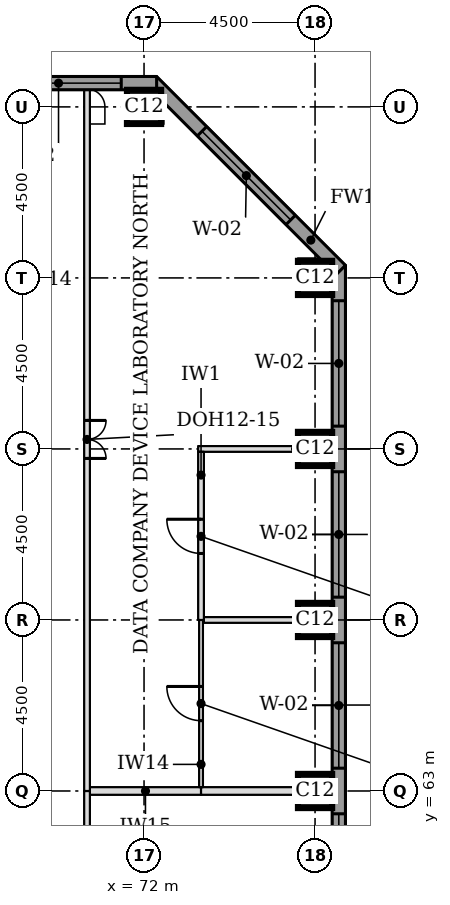
"""IFC4 building model, lengths in metres.
Left out: names, types, materials, properties, quantities, classifications, styles, units other than length and angle.
Written with IfcOpenShell. Run it as: python <this file> out.ifc"""

import sys

from ifc_helpers import new_model, si_unit, direction, frame, frame_2d, origin, origin_2d, place, context, subcontext, project, spatial, rectangle, extrude, element, fill, save


model = new_model("IFC4")
c1 = context("Model", 3, precision=1e-05, world=origin(), true_north=direction((0.0, 1.0)))
c2 = subcontext(c1, "Body", "Model", "MODEL_VIEW")
j1 = project(units=[si_unit("LENGTHUNIT", "METRE"), si_unit("PLANEANGLEUNIT", "RADIAN")], contexts=[c1])
p1 = place(None, origin())
s1 = spatial("IfcSite", under=j1, at=p1, CompositionType="ELEMENT")
p2 = place(p1, origin())
s2 = spatial("IfcBuilding", under=s1, at=p2, CompositionType="ELEMENT")
p3 = place(p2, frame((0.0, 0.0, 252.6)))
s3 = spatial("IfcBuildingStorey", under=s2, at=p3, CompositionType="ELEMENT", Elevation=252.6)
for number, where, z_axis, x_axis in (
    (1, (76.5, 63.0, 0.0), (0.0, 0.0, 1.0), (1.0, 0.0, 0.0)),
    (2, (76.5, 67.5, 0.0), (0.0, 0.0, 1.0), (1.0, 0.0, 0.0)),
    (3, (76.5, 72.0, 0.0), (0.0, 0.0, 1.0), (1.0, 0.0, 0.0)),
    (4, (76.5, 76.5, 0.0), (0.0, 0.0, 1.0), (1.0, 0.0, 0.0)),
    (5, (72.0, 81.0, 0.0), (0.0, 0.0, 1.0), (1.0, 0.0, 0.0)),
):
    element("IfcColumn", number, at=place(p3, frame(where, z_axis=z_axis, x_axis=x_axis)), inside=s3, PredefinedType="COLUMN", context=c2, shape_type="SweptSolid", body=[
        extrude(rectangle(XDim=0.9, YDim=0.9, at=origin_2d()), origin(), (0.0, 0.0, 1.0), 3.7),
    ])
p4 = place(p3, frame((77.125, 44.669, 0.0), z_axis=(0.0, 0.0, 1.0), x_axis=(0.0, 1.0, 0.0)))
e6 = element("IfcWall", 6, at=p4, inside=s3, PredefinedType="STANDARD", context=c2, shape_type="SweptSolid", body=[
    extrude(rectangle(XDim=32.163, YDim=0.35, at=frame_2d((16.081, 0.0))), origin(), (0.0, 0.0, 1.0), 3.525),
])
p5 = place(p4, frame((0.931, 0.0, 0.9)))
e7 = element("IfcOpeningElement", 7, at=p5, cuts=e6, PredefinedType="OPENING", context=c2, shape_type="SweptSolid", body=[
    extrude(rectangle(XDim=3.3, YDim=1.9, at=frame_2d((1.65, 0.95))), frame((0.0, 0.185, 0.0), z_axis=(0.0, -1.0, 0.0), x_axis=(1.0, 0.0, 0.0)), (0.0, 0.0, 1.0), 0.37),
])
p6 = place(p4, frame((5.431, 0.0, 0.9)))
e8 = element("IfcOpeningElement", 8, at=p6, cuts=e6, PredefinedType="OPENING", context=c2, shape_type="SweptSolid", body=[
    extrude(rectangle(XDim=3.3, YDim=1.9, at=frame_2d((1.65, 0.95))), frame((0.0, 0.185, 0.0), z_axis=(0.0, -1.0, 0.0), x_axis=(1.0, 0.0, 0.0)), (0.0, 0.0, 1.0), 0.37),
])
p7 = place(p4, frame((9.931, 0.0, 0.9)))
e9 = element("IfcOpeningElement", 9, at=p7, cuts=e6, PredefinedType="OPENING", context=c2, shape_type="SweptSolid", body=[
    extrude(rectangle(XDim=3.3, YDim=1.9, at=frame_2d((1.65, 0.95))), frame((0.0, 0.185, 0.0), z_axis=(0.0, -1.0, 0.0), x_axis=(1.0, 0.0, 0.0)), (0.0, 0.0, 1.0), 0.37),
])
p8 = place(p4, frame((14.431, 0.0, 0.9)))
e10 = element("IfcOpeningElement", 10, at=p8, cuts=e6, PredefinedType="OPENING", context=c2, shape_type="SweptSolid", body=[
    extrude(rectangle(XDim=3.3, YDim=1.9, at=frame_2d((1.65, 0.95))), frame((0.0, 0.185, 0.0), z_axis=(0.0, -1.0, 0.0), x_axis=(1.0, 0.0, 0.0)), (0.0, 0.0, 1.0), 0.37),
])
p9 = place(p4, frame((18.931, 0.0, 0.9)))
e11 = element("IfcOpeningElement", 11, at=p9, cuts=e6, PredefinedType="OPENING", context=c2, shape_type="SweptSolid", body=[
    extrude(rectangle(XDim=3.3, YDim=1.9, at=frame_2d((1.65, 0.95))), frame((0.0, 0.185, 0.0), z_axis=(0.0, -1.0, 0.0), x_axis=(1.0, 0.0, 0.0)), (0.0, 0.0, 1.0), 0.37),
])
p10 = place(p4, frame((23.431, 0.0, 0.9)))
e12 = element("IfcOpeningElement", 12, at=p10, cuts=e6, PredefinedType="OPENING", context=c2, shape_type="SweptSolid", body=[
    extrude(rectangle(XDim=3.3, YDim=1.9, at=frame_2d((1.65, 0.95))), frame((0.0, 0.185, 0.0), z_axis=(0.0, -1.0, 0.0), x_axis=(1.0, 0.0, 0.0)), (0.0, 0.0, 1.0), 0.37),
])
p11 = place(p4, frame((27.931, 0.0, 0.9)))
e13 = element("IfcOpeningElement", 13, at=p11, cuts=e6, PredefinedType="OPENING", context=c2, shape_type="SweptSolid", body=[
    extrude(rectangle(XDim=3.3, YDim=1.9, at=frame_2d((1.65, 0.95))), frame((0.0, 0.185, 0.0), z_axis=(0.0, -1.0, 0.0), x_axis=(1.0, 0.0, 0.0)), (0.0, 0.0, 1.0), 0.37),
])
p12 = place(p3, frame((77.176, 76.708, 0.0), z_axis=(0.0, 0.0, 1.0), x_axis=(-0.707106781187, 0.707106781187, 0.0)))
e14 = element("IfcWall", 14, at=p12, inside=s3, PredefinedType="STANDARD", context=c2, shape_type="SweptSolid", body=[
    extrude(rectangle(XDim=7.027, YDim=0.35, at=frame_2d((3.513, 0.0))), origin(), (0.0, 0.0, 1.0), 3.525),
])
p13 = place(p12, frame((1.863, 0.0, 0.9)))
e15 = element("IfcOpeningElement", 15, at=p13, cuts=e14, PredefinedType="OPENING", context=c2, shape_type="SweptSolid", body=[
    extrude(rectangle(XDim=3.3, YDim=1.9, at=frame_2d((1.65, 0.95))), frame((0.0, 0.185, 0.0), z_axis=(0.0, -1.0, 0.0), x_axis=(1.0, 0.0, 0.0)), (0.0, 0.0, 1.0), 0.37),
])
p14 = place(p3, frame((72.331, 81.625, 0.0), z_axis=(0.0, 0.0, 1.0), x_axis=(-1.0, 0.0, 0.0)))
e16 = element("IfcWall", 16, at=p14, inside=s3, PredefinedType="STANDARD", context=c2, shape_type="SweptSolid", body=[
    extrude(rectangle(XDim=32.163, YDim=0.35, at=frame_2d((16.081, 0.0))), origin(), (0.0, 0.0, 1.0), 3.525),
])
p15 = place(p14, frame((0.931, 0.0, 0.9)))
e17 = element("IfcOpeningElement", 17, at=p15, cuts=e16, PredefinedType="OPENING", context=c2, shape_type="SweptSolid", body=[
    extrude(rectangle(XDim=3.3, YDim=1.9, at=frame_2d((1.65, 0.95))), frame((0.0, 0.185, 0.0), z_axis=(0.0, -1.0, 0.0), x_axis=(1.0, 0.0, 0.0)), (0.0, 0.0, 1.0), 0.37),
])
p16 = place(p14, frame((5.431, 0.0, 0.9)))
e18 = element("IfcOpeningElement", 18, at=p16, cuts=e16, PredefinedType="OPENING", context=c2, shape_type="SweptSolid", body=[
    extrude(rectangle(XDim=3.3, YDim=1.9, at=frame_2d((1.65, 0.95))), frame((0.0, 0.185, 0.0), z_axis=(0.0, -1.0, 0.0), x_axis=(1.0, 0.0, 0.0)), (0.0, 0.0, 1.0), 0.37),
])
p17 = place(p14, frame((9.931, 0.0, 0.9)))
e19 = element("IfcOpeningElement", 19, at=p17, cuts=e16, PredefinedType="OPENING", context=c2, shape_type="SweptSolid", body=[
    extrude(rectangle(XDim=3.3, YDim=1.9, at=frame_2d((1.65, 0.95))), frame((0.0, 0.185, 0.0), z_axis=(0.0, -1.0, 0.0), x_axis=(1.0, 0.0, 0.0)), (0.0, 0.0, 1.0), 0.37),
])
p18 = place(p14, frame((14.431, 0.0, 0.9)))
e20 = element("IfcOpeningElement", 20, at=p18, cuts=e16, PredefinedType="OPENING", context=c2, shape_type="SweptSolid", body=[
    extrude(rectangle(XDim=3.3, YDim=1.9, at=frame_2d((1.65, 0.95))), frame((0.0, 0.185, 0.0), z_axis=(0.0, -1.0, 0.0), x_axis=(1.0, 0.0, 0.0)), (0.0, 0.0, 1.0), 0.37),
])
p19 = place(p14, frame((18.931, 0.0, 0.9)))
e21 = element("IfcOpeningElement", 21, at=p19, cuts=e16, PredefinedType="OPENING", context=c2, shape_type="SweptSolid", body=[
    extrude(rectangle(XDim=3.3, YDim=1.9, at=frame_2d((1.65, 0.95))), frame((0.0, 0.185, 0.0), z_axis=(0.0, -1.0, 0.0), x_axis=(1.0, 0.0, 0.0)), (0.0, 0.0, 1.0), 0.37),
])
p20 = place(p14, frame((23.431, 0.0, 0.9)))
e22 = element("IfcOpeningElement", 22, at=p20, cuts=e16, PredefinedType="OPENING", context=c2, shape_type="SweptSolid", body=[
    extrude(rectangle(XDim=3.3, YDim=1.9, at=frame_2d((1.65, 0.95))), frame((0.0, 0.185, 0.0), z_axis=(0.0, -1.0, 0.0), x_axis=(1.0, 0.0, 0.0)), (0.0, 0.0, 1.0), 0.37),
])
p21 = place(p14, frame((27.931, 0.0, 0.9)))
e23 = element("IfcOpeningElement", 23, at=p21, cuts=e16, PredefinedType="OPENING", context=c2, shape_type="SweptSolid", body=[
    extrude(rectangle(XDim=3.3, YDim=1.9, at=frame_2d((1.65, 0.95))), frame((0.0, 0.185, 0.0), z_axis=(0.0, -1.0, 0.0), x_axis=(1.0, 0.0, 0.0)), (0.0, 0.0, 1.0), 0.37),
])
p22 = place(p3, frame((70.575, 63.0, 0.0), z_axis=(0.0, 0.0, 1.0), x_axis=(1.0, 0.0, 0.0)))
e24 = element("IfcWall", 24, at=p22, inside=s3, PredefinedType="PARTITIONING", context=c2, shape_type="SweptSolid", body=[
    extrude(rectangle(XDim=2.925, YDim=0.2, at=frame_2d((1.462, 0.0))), origin(), (0.0, 0.0, 1.0), 3.55),
])
p23 = place(p3, frame((73.5, 63.0, 0.0), z_axis=(0.0, 0.0, 1.0), x_axis=(1.0, 0.0, 0.0)))
e25 = element("IfcWall", 25, at=p23, inside=s3, PredefinedType="PARTITIONING", context=c2, shape_type="SweptSolid", body=[
    extrude(rectangle(XDim=3.45, YDim=0.2, at=frame_2d((1.725, 0.0))), origin(), (0.0, 0.0, 1.0), 3.55),
])
p24 = place(p3, frame((73.575, 67.5, 0.0), z_axis=(0.0, 0.0, 1.0), x_axis=(1.0, 0.0, 0.0)))
e26 = element("IfcWall", 26, at=p24, inside=s3, PredefinedType="PARTITIONING", context=c2, shape_type="SweptSolid", body=[
    extrude(rectangle(XDim=3.375, YDim=0.15, at=frame_2d((1.688, 0.0))), origin(), (0.0, 0.0, 1.0), 3.55),
])
p25 = place(p3, frame((73.425, 72.0, 0.0), z_axis=(0.0, 0.0, 1.0), x_axis=(1.0, 0.0, 0.0)))
e27 = element("IfcWall", 27, at=p25, inside=s3, PredefinedType="PARTITIONING", context=c2, shape_type="SweptSolid", body=[
    extrude(rectangle(XDim=3.525, YDim=0.15, at=frame_2d((1.762, 0.0))), origin(), (0.0, 0.0, 1.0), 3.55),
])
p26 = place(p3, frame((70.5, 45.0, 0.0), z_axis=(0.0, 0.0, 1.0), x_axis=(0.0, 1.0, 0.0)))
e28 = element("IfcWall", 28, at=p26, inside=s3, PredefinedType="PARTITIONING", context=c2, shape_type="SweptSolid", body=[
    extrude(rectangle(XDim=18.0, YDim=0.15, at=frame_2d((9.0, 0.0))), origin(), (0.0, 0.0, 1.0), 3.55),
])
p27 = place(p26, frame((8.5, 0.0, 0.0)))
e29 = element("IfcOpeningElement", 29, at=p27, cuts=e28, PredefinedType="OPENING", context=c2, shape_type="SweptSolid", body=[
    extrude(rectangle(XDim=1.0, YDim=2.1, at=frame_2d((0.5, 1.05))), frame((0.0, 0.085, 0.0), z_axis=(0.0, -1.0, 0.0), x_axis=(1.0, 0.0, 0.0)), (0.0, 0.0, 1.0), 0.17),
])
p28 = place(p3, frame((70.5, 63.0, 0.0), z_axis=(0.0, 0.0, 1.0), x_axis=(0.0, 1.0, 0.0)))
e30 = element("IfcWall", 30, at=p28, inside=s3, PredefinedType="PARTITIONING", context=c2, shape_type="SweptSolid", body=[
    extrude(rectangle(XDim=18.45, YDim=0.15, at=frame_2d((9.225, 0.0))), origin(), (0.0, 0.0, 1.0), 3.55),
])
p29 = place(p28, frame((8.75, 0.0, 0.0)))
e31 = element("IfcOpeningElement", 31, at=p29, cuts=e30, PredefinedType="OPENING", context=c2, shape_type="SweptSolid", body=[
    extrude(rectangle(XDim=1.0, YDim=2.1, at=frame_2d((0.5, 1.05))), frame((0.0, 0.085, 0.0), z_axis=(0.0, -1.0, 0.0), x_axis=(1.0, 0.0, 0.0)), (0.0, 0.0, 1.0), 0.17),
])
p30 = place(p3, frame((73.5, 63.1, 0.0), z_axis=(0.0, 0.0, 1.0), x_axis=(0.0, 1.0, 0.0)))
e32 = element("IfcWall", 32, at=p30, inside=s3, PredefinedType="PARTITIONING", context=c2, shape_type="SweptSolid", body=[
    extrude(rectangle(XDim=4.4, YDim=0.1, at=frame_2d((2.2, 0.0))), origin(), (0.0, 0.0, 1.0), 3.55),
])
p31 = place(p30, frame((1.75, 0.0, 0.0)))
e33 = element("IfcOpeningElement", 33, at=p31, cuts=e32, PredefinedType="OPENING", context=c2, shape_type="SweptSolid", body=[
    extrude(rectangle(XDim=0.9, YDim=2.1, at=frame_2d((0.45, 1.05))), frame((0.0, 0.06, 0.0), z_axis=(0.0, -1.0, 0.0), x_axis=(1.0, 0.0, 0.0)), (0.0, 0.0, 1.0), 0.12),
])
p32 = place(p3, frame((73.5, 67.5, 0.0), z_axis=(0.0, 0.0, 1.0), x_axis=(0.0, 1.0, 0.0)))
e34 = element("IfcWall", 34, at=p32, inside=s3, PredefinedType="PARTITIONING", context=c2, shape_type="SweptSolid", body=[
    extrude(rectangle(XDim=4.425, YDim=0.15, at=frame_2d((2.212, 0.0))), origin(), (0.0, 0.0, 1.0), 3.55),
])
p33 = place(p32, frame((1.75, 0.0, 0.0)))
e35 = element("IfcOpeningElement", 35, at=p33, cuts=e34, PredefinedType="OPENING", context=c2, shape_type="SweptSolid", body=[
    extrude(rectangle(XDim=0.9, YDim=2.1, at=frame_2d((0.45, 1.05))), frame((0.0, 0.085, 0.0), z_axis=(0.0, -1.0, 0.0), x_axis=(1.0, 0.0, 0.0)), (0.0, 0.0, 1.0), 0.17),
])
p34 = place(p8, origin())
e36 = element("IfcWindow", 36, at=p34, inside=s3, PartitioningType="SINGLE_PANEL", PredefinedType="WINDOW", context=c2, shape_type="SweptSolid", body=[
    extrude(rectangle(XDim=3.3, YDim=1.9, at=frame_2d((1.65, 0.95))), frame((0.0, 0.085, 0.0), z_axis=(0.0, -1.0, 0.0), x_axis=(1.0, 0.0, 0.0)), (0.0, 0.0, 1.0), 0.06),
])
fill(e10, e36)
p35 = place(p9, origin())
e37 = element("IfcWindow", 37, at=p35, inside=s3, PartitioningType="SINGLE_PANEL", PredefinedType="WINDOW", context=c2, shape_type="SweptSolid", body=[
    extrude(rectangle(XDim=3.3, YDim=1.9, at=frame_2d((1.65, 0.95))), frame((0.0, 0.085, 0.0), z_axis=(0.0, -1.0, 0.0), x_axis=(1.0, 0.0, 0.0)), (0.0, 0.0, 1.0), 0.06),
])
fill(e11, e37)
p36 = place(p10, origin())
e38 = element("IfcWindow", 38, at=p36, inside=s3, PartitioningType="SINGLE_PANEL", PredefinedType="WINDOW", context=c2, shape_type="SweptSolid", body=[
    extrude(rectangle(XDim=3.3, YDim=1.9, at=frame_2d((1.65, 0.95))), frame((0.0, 0.085, 0.0), z_axis=(0.0, -1.0, 0.0), x_axis=(1.0, 0.0, 0.0)), (0.0, 0.0, 1.0), 0.06),
])
fill(e12, e38)
p37 = place(p11, origin())
e39 = element("IfcWindow", 39, at=p37, inside=s3, PartitioningType="SINGLE_PANEL", PredefinedType="WINDOW", context=c2, shape_type="SweptSolid", body=[
    extrude(rectangle(XDim=3.3, YDim=1.9, at=frame_2d((1.65, 0.95))), frame((0.0, 0.085, 0.0), z_axis=(0.0, -1.0, 0.0), x_axis=(1.0, 0.0, 0.0)), (0.0, 0.0, 1.0), 0.06),
])
fill(e13, e39)
p38 = place(p13, origin())
e40 = element("IfcWindow", 40, at=p38, inside=s3, PartitioningType="SINGLE_PANEL", PredefinedType="WINDOW", context=c2, shape_type="SweptSolid", body=[
    extrude(rectangle(XDim=3.3, YDim=1.9, at=frame_2d((1.65, 0.95))), frame((0.0, 0.085, 0.0), z_axis=(0.0, -1.0, 0.0), x_axis=(1.0, 0.0, 0.0)), (0.0, 0.0, 1.0), 0.06),
])
fill(e15, e40)
p39 = place(p15, origin())
e41 = element("IfcWindow", 41, at=p39, inside=s3, PartitioningType="SINGLE_PANEL", PredefinedType="WINDOW", context=c2, shape_type="SweptSolid", body=[
    extrude(rectangle(XDim=3.3, YDim=1.9, at=frame_2d((1.65, 0.95))), frame((0.0, 0.085, 0.0), z_axis=(0.0, -1.0, 0.0), x_axis=(1.0, 0.0, 0.0)), (0.0, 0.0, 1.0), 0.06),
])
fill(e17, e41)
p40 = place(p29, frame((1.0, 0.0, 0.0), z_axis=(0.0, 0.0, 1.0), x_axis=(-1.0, 0.0, 0.0)))
e42 = element("IfcDoor", 42, at=p40, inside=s3, OperationType="DOUBLE_DOOR_SINGLE_SWING", PredefinedType="DOOR", context=c2, shape_type="SweptSolid", body=[
    extrude(rectangle(XDim=1.0, YDim=2.1, at=frame_2d((0.5, 1.05))), frame((0.0, 0.025, 0.0), z_axis=(0.0, -1.0, 0.0), x_axis=(1.0, 0.0, 0.0)), (0.0, 0.0, 1.0), 0.05),
])
fill(e31, e42)
p41 = place(p31, origin())
e43 = element("IfcDoor", 43, at=p41, inside=s3, OperationType="SINGLE_SWING_RIGHT", PredefinedType="DOOR", context=c2, shape_type="SweptSolid", body=[
    extrude(rectangle(XDim=0.9, YDim=2.1, at=frame_2d((0.45, 1.05))), frame((0.0, 0.025, 0.0), z_axis=(0.0, -1.0, 0.0), x_axis=(1.0, 0.0, 0.0)), (0.0, 0.0, 1.0), 0.05),
])
fill(e33, e43)
p42 = place(p33, origin())
e44 = element("IfcDoor", 44, at=p42, inside=s3, OperationType="SINGLE_SWING_RIGHT", PredefinedType="DOOR", context=c2, shape_type="SweptSolid", body=[
    extrude(rectangle(XDim=0.9, YDim=2.1, at=frame_2d((0.45, 1.05))), frame((0.0, 0.025, 0.0), z_axis=(0.0, -1.0, 0.0), x_axis=(1.0, 0.0, 0.0)), (0.0, 0.0, 1.0), 0.05),
])
fill(e35, e44)
save(model, sys.argv[1])
